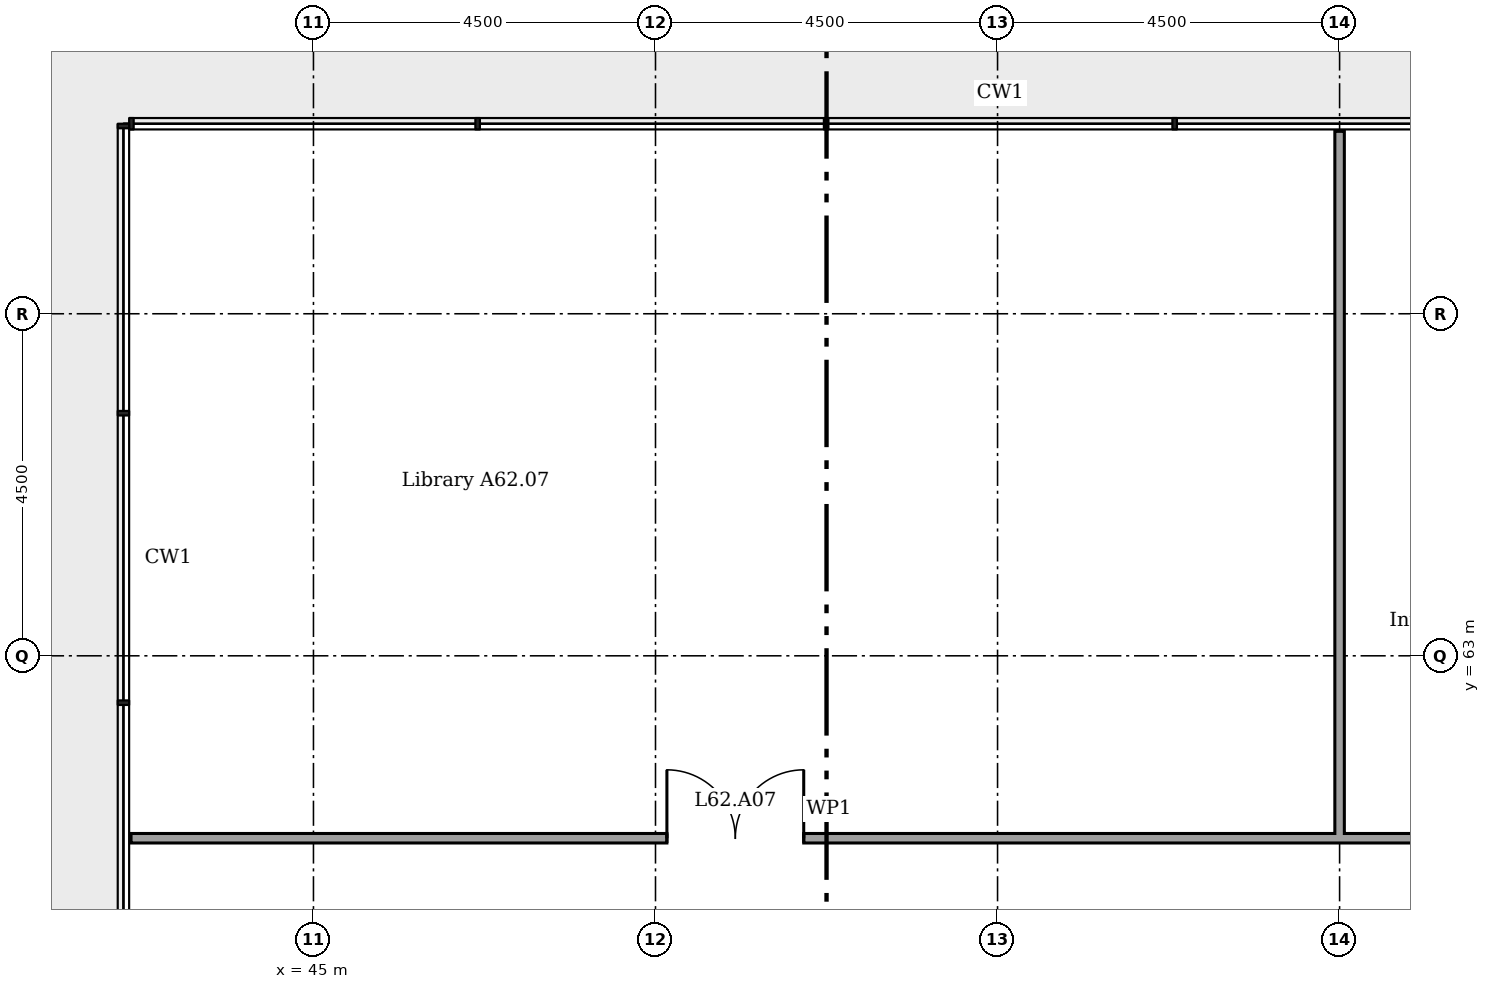
"""IFC4 building model, lengths in metres.
Left out: names, types, materials, properties, quantities, classifications, styles, units other than length and angle.
Written with IfcOpenShell. Run it as: python <this file> out.ifc"""

import sys

from ifc_helpers import new_model, si_unit, direction, frame, frame_2d, origin, place, context, subcontext, project, spatial, rectangle, extrude, element, fill, save


model = new_model("IFC4")
c1 = context("Model", 3, precision=1e-05, world=origin(), true_north=direction((0.0, 1.0)))
c2 = subcontext(c1, "Body", "Model", "MODEL_VIEW")
j1 = project(units=[si_unit("LENGTHUNIT", "METRE"), si_unit("PLANEANGLEUNIT", "RADIAN")], contexts=[c1])
p1 = place(None, origin())
s1 = spatial("IfcSite", under=j1, at=p1, CompositionType="ELEMENT")
p2 = place(p1, origin())
s2 = spatial("IfcBuilding", under=s1, at=p2, CompositionType="ELEMENT")
p3 = place(p2, frame((0.0, 0.0, 242.4)))
s3 = spatial("IfcBuildingStorey", under=s2, at=p3, CompositionType="ELEMENT", Elevation=242.4)
p4 = place(p3, frame((42.6, 60.6, 0.0)))
e1 = element("IfcWall", 1, at=p4, inside=s3, PredefinedType="PARTITIONING", context=c2, shape_type="SweptSolid", body=[
    extrude(rectangle(XDim=18.362, YDim=0.125, at=frame_2d((9.181, 0.0))), origin(), (0.0, 0.0, 1.0), 3.4),
])
p5 = place(p4, frame((7.05, 0.0, 0.0)))
e2 = element("IfcOpeningElement", 2, at=p5, cuts=e1, PredefinedType="OPENING", context=c2, shape_type="SweptSolid", body=[
    extrude(rectangle(XDim=1.8, YDim=2.1, at=frame_2d((0.9, 1.05))), frame((0.0, 0.073, 0.0), z_axis=(0.0, -1.0, 0.0), x_axis=(1.0, 0.0, 0.0)), (0.0, 0.0, 1.0), 0.145),
])
p6 = place(p3, frame((58.5, 60.6, 0.0), z_axis=(0.0, 0.0, 1.0), x_axis=(0.0, 1.0, 0.0)))
e3 = element("IfcWall", 3, at=p6, inside=s3, PredefinedType="PARTITIONING", context=c2, shape_type="SweptSolid", body=[
    extrude(rectangle(XDim=9.3, YDim=0.125, at=frame_2d((4.65, 0.0))), origin(), (0.0, 0.0, 1.0), 2.626),
])
p7 = place(p5, origin())
e4 = element("IfcDoor", 4, at=p7, inside=s3, OperationType="DOUBLE_DOOR_SINGLE_SWING", PredefinedType="DOOR", context=c2, shape_type="SweptSolid", body=[
    extrude(rectangle(XDim=1.8, YDim=2.1, at=frame_2d((0.9, 1.05))), frame((0.0, 0.025, 0.0), z_axis=(0.0, -1.0, 0.0), x_axis=(1.0, 0.0, 0.0)), (0.0, 0.0, 1.0), 0.05),
])
fill(e2, e4)
save(model, sys.argv[1])
